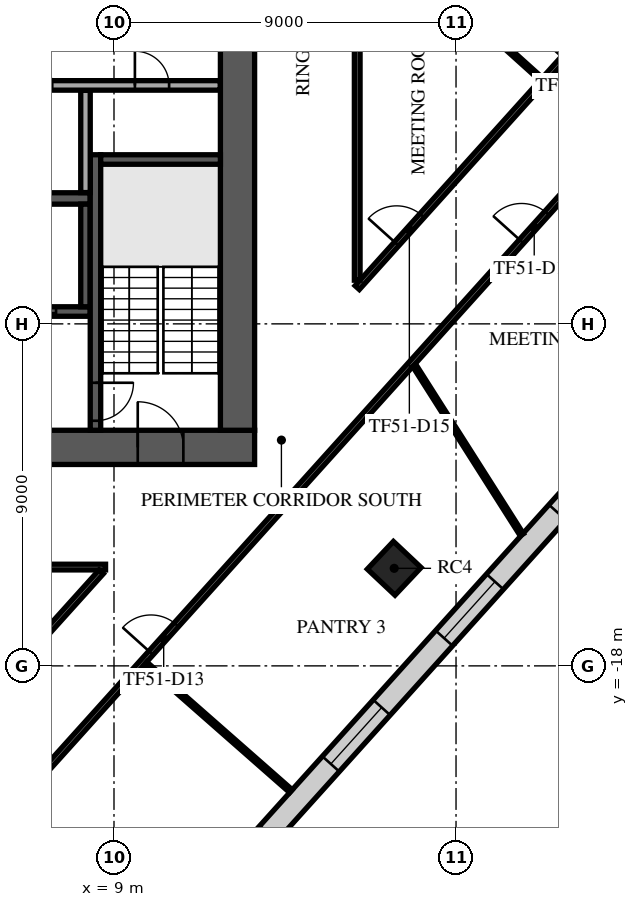
"""IFC4 building model, lengths in metres.
Left out: names, types, materials, properties, quantities, classifications, styles, units other than length and angle.
Written with IfcOpenShell. Run it as: python <this file> out.ifc"""

import sys

from ifc_helpers import new_model, si_unit, direction, frame, frame_2d, origin, origin_2d, place, context, subcontext, project, spatial, rectangle, extrude, element, fill, save


model = new_model("IFC4")
c1 = context("Model", 3, precision=1e-05, world=origin(), true_north=direction((0.0, 1.0)))
c2 = subcontext(c1, "Body", "Model", "MODEL_VIEW")
j1 = project(units=[si_unit("LENGTHUNIT", "METRE"), si_unit("PLANEANGLEUNIT", "RADIAN")], contexts=[c1])
p1 = place(None, origin())
s1 = spatial("IfcSite", under=j1, at=p1, CompositionType="ELEMENT")
p2 = place(p1, origin())
s2 = spatial("IfcBuilding", under=s1, at=p2, CompositionType="ELEMENT")
p3 = place(p2, frame((0.0, 0.0, 217.3)))
s3 = spatial("IfcBuildingStorey", under=s2, at=p3, CompositionType="ELEMENT", Elevation=217.3)
p4 = place(p3, frame((16.373, -15.433, 0.0), z_axis=(0.0, 0.0, 1.0), x_axis=(0.685916152371, 0.727680583715, 0.0)))
e1 = element("IfcColumn", 1, at=p4, inside=s3, PredefinedType="COLUMN", context=c2, shape_type="SweptSolid", body=[
    extrude(rectangle(XDim=1.0, YDim=1.0, at=origin_2d()), origin(), (0.0, 0.0, 1.0), 4.0),
])
p5 = place(p3, frame((-12.7, -12.25, 0.0), z_axis=(0.0, 0.0, 1.0), x_axis=(1.0, 0.0, 0.0)))
e2 = element("IfcWall", 2, at=p5, inside=s3, PredefinedType="SHEAR", context=c2, shape_type="SweptSolid", body=[
    extrude(rectangle(XDim=25.4, YDim=0.9, at=frame_2d((12.7, 0.0))), origin(), (0.0, 0.0, 1.0), 3.62),
])
p6 = place(p5, frame((7.6, 0.0, 0.0)))
e3 = element("IfcOpeningElement", 3, at=p6, cuts=e2, PredefinedType="OPENING", context=c2, shape_type="SweptSolid", body=[
    extrude(rectangle(XDim=2.0, YDim=2.1, at=frame_2d((1.0, 1.05))), frame((0.0, 0.46, 0.0), z_axis=(0.0, -1.0, 0.0), x_axis=(1.0, 0.0, 0.0)), (0.0, 0.0, 1.0), 0.92),
])
p7 = place(p5, frame((17.725, 0.0, 0.0)))
e4 = element("IfcOpeningElement", 4, at=p7, cuts=e2, PredefinedType="OPENING", context=c2, shape_type="SweptSolid", body=[
    extrude(rectangle(XDim=1.2, YDim=2.1, at=frame_2d((0.6, 1.05))), frame((0.0, 0.46, 0.0), z_axis=(0.0, -1.0, 0.0), x_axis=(1.0, 0.0, 0.0)), (0.0, 0.0, 1.0), 0.92),
])
p8 = place(p5, frame((1.875, 0.0, 0.0)))
e5 = element("IfcOpeningElement", 5, at=p8, cuts=e2, PredefinedType="OPENING", context=c2, shape_type="SweptSolid", body=[
    extrude(rectangle(XDim=1.2, YDim=2.1, at=frame_2d((0.6, 1.05))), frame((0.0, 0.46, 0.0), z_axis=(0.0, -1.0, 0.0), x_axis=(1.0, 0.0, 0.0)), (0.0, 0.0, 1.0), 0.92),
])
p9 = place(p5, frame((22.325, 0.0, 0.0)))
e6 = element("IfcOpeningElement", 6, at=p9, cuts=e2, PredefinedType="OPENING", context=c2, shape_type="SweptSolid", body=[
    extrude(rectangle(XDim=1.2, YDim=2.1, at=frame_2d((0.6, 1.05))), frame((0.0, 0.46, 0.0), z_axis=(0.0, -1.0, 0.0), x_axis=(1.0, 0.0, 0.0)), (0.0, 0.0, 1.0), 0.92),
])
p10 = place(p3, frame((12.25, -11.8, 0.0), z_axis=(0.0, 0.0, 1.0), x_axis=(0.0, 1.0, 0.0)))
e7 = element("IfcWall", 7, at=p10, inside=s3, PredefinedType="SHEAR", context=c2, shape_type="SweptSolid", body=[
    extrude(rectangle(XDim=23.6, YDim=0.9, at=frame_2d((11.8, 0.0))), origin(), (0.0, 0.0, 1.0), 3.62),
])
p11 = place(p10, frame((10.6, 0.0, 0.0)))
e8 = element("IfcOpeningElement", 8, at=p11, cuts=e7, PredefinedType="OPENING", context=c2, shape_type="SweptSolid", body=[
    extrude(rectangle(XDim=2.4, YDim=2.4, at=frame_2d((1.2, 1.2))), frame((0.0, 0.46, 0.0), z_axis=(0.0, -1.0, 0.0), x_axis=(1.0, 0.0, 0.0)), (0.0, 0.0, 1.0), 0.92),
])
p12 = place(p3, frame((-2.875, -5.7, 0.0), z_axis=(0.0, 0.0, 1.0), x_axis=(1.0, 0.0, 0.0)))
e9 = element("IfcWall", 9, at=p12, inside=s3, PredefinedType="SOLIDWALL", context=c2, shape_type="SweptSolid", body=[
    extrude(rectangle(XDim=11.25, YDim=0.3, at=frame_2d((5.625, 0.0))), origin(), (0.0, 0.0, 1.0), 3.62),
])
p13 = place(p3, frame((-2.875, -8.675, 0.0), z_axis=(0.0, 0.0, 1.0), x_axis=(1.0, 0.0, 0.0)))
e10 = element("IfcWall", 10, at=p13, inside=s3, PredefinedType="SOLIDWALL", context=c2, shape_type="SweptSolid", body=[
    extrude(rectangle(XDim=11.25, YDim=0.25, at=frame_2d((5.625, 0.0))), origin(), (0.0, 0.0, 1.0), 3.62),
])
p14 = place(p13, frame((0.9, 0.0, 0.0)))
e11 = element("IfcOpeningElement", 11, at=p14, cuts=e10, PredefinedType="OPENING", context=c2, shape_type="SweptSolid", body=[
    extrude(rectangle(XDim=1.2, YDim=2.1, at=frame_2d((0.6, 1.05))), frame((0.0, 0.135, 0.0), z_axis=(0.0, -1.0, 0.0), x_axis=(1.0, 0.0, 0.0)), (0.0, 0.0, 1.0), 0.27),
])
p15 = place(p13, frame((3.65, 0.0, 0.0)))
e12 = element("IfcOpeningElement", 12, at=p15, cuts=e10, PredefinedType="OPENING", context=c2, shape_type="SweptSolid", body=[
    extrude(rectangle(XDim=1.2, YDim=2.1, at=frame_2d((0.6, 1.05))), frame((0.0, 0.135, 0.0), z_axis=(0.0, -1.0, 0.0), x_axis=(1.0, 0.0, 0.0)), (0.0, 0.0, 1.0), 0.27),
])
p16 = place(p13, frame((6.4, 0.0, 0.0)))
e13 = element("IfcOpeningElement", 13, at=p16, cuts=e10, PredefinedType="OPENING", context=c2, shape_type="SweptSolid", body=[
    extrude(rectangle(XDim=1.2, YDim=2.1, at=frame_2d((0.6, 1.05))), frame((0.0, 0.135, 0.0), z_axis=(0.0, -1.0, 0.0), x_axis=(1.0, 0.0, 0.0)), (0.0, 0.0, 1.0), 0.27),
])
p17 = place(p13, frame((9.15, 0.0, 0.0)))
e14 = element("IfcOpeningElement", 14, at=p17, cuts=e10, PredefinedType="OPENING", context=c2, shape_type="SweptSolid", body=[
    extrude(rectangle(XDim=1.2, YDim=2.1, at=frame_2d((0.6, 1.05))), frame((0.0, 0.135, 0.0), z_axis=(0.0, -1.0, 0.0), x_axis=(1.0, 0.0, 0.0)), (0.0, 0.0, 1.0), 0.27),
])
p18 = place(p3, frame((8.25, -8.55, 0.0), z_axis=(0.0, 0.0, 1.0), x_axis=(0.0, 1.0, 0.0)))
e15 = element("IfcWall", 15, at=p18, inside=s3, PredefinedType="SOLIDWALL", context=c2, shape_type="SweptSolid", body=[
    extrude(rectangle(XDim=2.7, YDim=0.25, at=frame_2d((1.35, 0.0))), origin(), (0.0, 0.0, 1.0), 3.62),
])
p19 = place(p3, frame((8.512, -4.55, 0.0), z_axis=(0.0, 0.0, 1.0), x_axis=(0.0, -1.0, 0.0)))
e16 = element("IfcWall", 16, at=p19, inside=s3, PredefinedType="SOLIDWALL", context=c2, shape_type="SweptSolid", body=[
    extrude(rectangle(XDim=7.25, YDim=0.275, at=frame_2d((3.625, 0.0))), origin(), (0.0, 0.0, 1.0), 3.62),
])
p20 = place(p19, frame((6.0, 0.0, 0.0)))
e17 = element("IfcOpeningElement", 17, at=p20, cuts=e16, PredefinedType="OPENING", context=c2, shape_type="SweptSolid", body=[
    extrude(rectangle(XDim=1.0, YDim=2.1, at=frame_2d((0.5, 1.05))), frame((0.0, 0.147, 0.0), z_axis=(0.0, -1.0, 0.0), x_axis=(1.0, 0.0, 0.0)), (0.0, 0.0, 1.0), 0.295),
])
p21 = place(p3, frame((8.65, -4.675, 0.0), z_axis=(0.0, 0.0, 1.0), x_axis=(1.0, 0.0, 0.0)))
e18 = element("IfcWall", 18, at=p21, inside=s3, PredefinedType="SOLIDWALL", context=c2, shape_type="SweptSolid", body=[
    extrude(rectangle(XDim=3.15, YDim=0.25, at=frame_2d((1.575, 0.0))), origin(), (0.0, 0.0, 1.0), 3.62),
])
p22 = place(p3, frame((8.25, -5.545, 0.0), z_axis=(0.0, 0.0, 1.0), x_axis=(0.0, 1.0, 0.0)))
e19 = element("IfcWall", 19, at=p22, inside=s3, PredefinedType="PARTITIONING", context=c2, shape_type="SweptSolid", body=[
    extrude(rectangle(XDim=2.69, YDim=0.25, at=frame_2d((1.345, 0.0))), origin(), (0.0, 0.0, 1.0), 3.62),
])
p23 = place(p3, frame((5.63, -2.725, 0.0), z_axis=(0.0, 0.0, 1.0), x_axis=(1.0, 0.0, 0.0)))
e20 = element("IfcWall", 20, at=p23, inside=s3, PredefinedType="PARTITIONING", context=c2, shape_type="SweptSolid", body=[
    extrude(rectangle(XDim=6.165, YDim=0.25, at=frame_2d((3.083, 0.0))), origin(), (0.0, 0.0, 1.0), 3.62),
])
p24 = place(p23, frame((0.745, 0.0, 0.0)))
e21 = element("IfcOpeningElement", 21, at=p24, cuts=e20, PredefinedType="OPENING", context=c2, shape_type="SweptSolid", body=[
    extrude(rectangle(XDim=1.0, YDim=2.1, at=frame_2d((0.5, 1.05))), frame((0.0, 0.135, 0.0), z_axis=(0.0, -1.0, 0.0), x_axis=(1.0, 0.0, 0.0)), (0.0, 0.0, 1.0), 0.27),
])
p25 = place(p23, frame((3.92, 0.0, 0.0)))
e22 = element("IfcOpeningElement", 22, at=p25, cuts=e20, PredefinedType="OPENING", context=c2, shape_type="SweptSolid", body=[
    extrude(rectangle(XDim=0.9, YDim=2.1, at=frame_2d((0.45, 1.05))), frame((0.0, 0.135, 0.0), z_axis=(0.0, -1.0, 0.0), x_axis=(1.0, 0.0, 0.0)), (0.0, 0.0, 1.0), 0.27),
])
p26 = place(p3, frame((1.962, -34.735, 0.0), z_axis=(0.0, 0.0, 1.0), x_axis=(0.669133181838, 0.743142506497, 0.0)))
e23 = element("IfcWall", 23, at=p26, inside=s3, PredefinedType="STANDARD", context=c2, shape_type="SweptSolid", body=[
    extrude(rectangle(XDim=49.0, YDim=0.6, at=frame_2d((24.5, 0.0))), origin(), (0.0, 0.0, 1.0), 3.62),
])
p27 = place(p26, frame((1.227, 0.0, 0.9)))
e24 = element("IfcOpeningElement", 24, at=p27, cuts=e23, PredefinedType="OPENING", context=c2, shape_type="SweptSolid", body=[
    extrude(rectangle(XDim=2.0, YDim=2.1, at=frame_2d((1.0, 1.05))), frame((0.0, 0.31, 0.0), z_axis=(0.0, -1.0, 0.0), x_axis=(1.0, 0.0, 0.0)), (0.0, 0.0, 1.0), 0.62),
])
p28 = place(p26, frame((5.682, 0.0, 0.9)))
e25 = element("IfcOpeningElement", 25, at=p28, cuts=e23, PredefinedType="OPENING", context=c2, shape_type="SweptSolid", body=[
    extrude(rectangle(XDim=2.0, YDim=2.1, at=frame_2d((1.0, 1.05))), frame((0.0, 0.31, 0.0), z_axis=(0.0, -1.0, 0.0), x_axis=(1.0, 0.0, 0.0)), (0.0, 0.0, 1.0), 0.62),
])
p29 = place(p26, frame((10.136, 0.0, 0.9)))
e26 = element("IfcOpeningElement", 26, at=p29, cuts=e23, PredefinedType="OPENING", context=c2, shape_type="SweptSolid", body=[
    extrude(rectangle(XDim=2.0, YDim=2.1, at=frame_2d((1.0, 1.05))), frame((0.0, 0.31, 0.0), z_axis=(0.0, -1.0, 0.0), x_axis=(1.0, 0.0, 0.0)), (0.0, 0.0, 1.0), 0.62),
])
p30 = place(p26, frame((14.591, 0.0, 0.9)))
e27 = element("IfcOpeningElement", 27, at=p30, cuts=e23, PredefinedType="OPENING", context=c2, shape_type="SweptSolid", body=[
    extrude(rectangle(XDim=2.0, YDim=2.1, at=frame_2d((1.0, 1.05))), frame((0.0, 0.31, 0.0), z_axis=(0.0, -1.0, 0.0), x_axis=(1.0, 0.0, 0.0)), (0.0, 0.0, 1.0), 0.62),
])
p31 = place(p26, frame((19.045, 0.0, 0.9)))
e28 = element("IfcOpeningElement", 28, at=p31, cuts=e23, PredefinedType="OPENING", context=c2, shape_type="SweptSolid", body=[
    extrude(rectangle(XDim=2.0, YDim=2.1, at=frame_2d((1.0, 1.05))), frame((0.0, 0.31, 0.0), z_axis=(0.0, -1.0, 0.0), x_axis=(1.0, 0.0, 0.0)), (0.0, 0.0, 1.0), 0.62),
])
p32 = place(p26, frame((23.5, 0.0, 0.9)))
e29 = element("IfcOpeningElement", 29, at=p32, cuts=e23, PredefinedType="OPENING", context=c2, shape_type="SweptSolid", body=[
    extrude(rectangle(XDim=2.0, YDim=2.1, at=frame_2d((1.0, 1.05))), frame((0.0, 0.31, 0.0), z_axis=(0.0, -1.0, 0.0), x_axis=(1.0, 0.0, 0.0)), (0.0, 0.0, 1.0), 0.62),
])
p33 = place(p26, frame((27.955, 0.0, 0.9)))
e30 = element("IfcOpeningElement", 30, at=p33, cuts=e23, PredefinedType="OPENING", context=c2, shape_type="SweptSolid", body=[
    extrude(rectangle(XDim=2.0, YDim=2.1, at=frame_2d((1.0, 1.05))), frame((0.0, 0.31, 0.0), z_axis=(0.0, -1.0, 0.0), x_axis=(1.0, 0.0, 0.0)), (0.0, 0.0, 1.0), 0.62),
])
p34 = place(p26, frame((32.409, 0.0, 0.9)))
e31 = element("IfcOpeningElement", 31, at=p34, cuts=e23, PredefinedType="OPENING", context=c2, shape_type="SweptSolid", body=[
    extrude(rectangle(XDim=2.0, YDim=2.1, at=frame_2d((1.0, 1.05))), frame((0.0, 0.31, 0.0), z_axis=(0.0, -1.0, 0.0), x_axis=(1.0, 0.0, 0.0)), (0.0, 0.0, 1.0), 0.62),
])
p35 = place(p26, frame((36.864, 0.0, 0.9)))
e32 = element("IfcOpeningElement", 32, at=p35, cuts=e23, PredefinedType="OPENING", context=c2, shape_type="SweptSolid", body=[
    extrude(rectangle(XDim=2.0, YDim=2.1, at=frame_2d((1.0, 1.05))), frame((0.0, 0.31, 0.0), z_axis=(0.0, -1.0, 0.0), x_axis=(1.0, 0.0, 0.0)), (0.0, 0.0, 1.0), 0.62),
])
p36 = place(p26, frame((41.318, 0.0, 0.9)))
e33 = element("IfcOpeningElement", 33, at=p36, cuts=e23, PredefinedType="OPENING", context=c2, shape_type="SweptSolid", body=[
    extrude(rectangle(XDim=2.0, YDim=2.1, at=frame_2d((1.0, 1.05))), frame((0.0, 0.31, 0.0), z_axis=(0.0, -1.0, 0.0), x_axis=(1.0, 0.0, 0.0)), (0.0, 0.0, 1.0), 0.62),
])
p37 = place(p26, frame((45.773, 0.0, 0.9)))
e34 = element("IfcOpeningElement", 34, at=p37, cuts=e23, PredefinedType="OPENING", context=c2, shape_type="SweptSolid", body=[
    extrude(rectangle(XDim=2.0, YDim=2.1, at=frame_2d((1.0, 1.05))), frame((0.0, 0.31, 0.0), z_axis=(0.0, -1.0, 0.0), x_axis=(1.0, 0.0, 0.0)), (0.0, 0.0, 1.0), 0.62),
])
p38 = place(p3, frame((-7.715, -15.4, 0.0), z_axis=(0.0, 0.0, 1.0), x_axis=(1.0, 0.0, 0.0)))
e35 = element("IfcWall", 35, at=p38, inside=s3, PredefinedType="PARTITIONING", context=c2, shape_type="SweptSolid", body=[
    extrude(rectangle(XDim=16.493, YDim=0.15, at=frame_2d((8.246, 0.0))), origin(), (0.0, 0.0, 1.0), 3.17),
])
p39 = place(p38, frame((2.3, 0.0, 0.0)))
e36 = element("IfcOpeningElement", 36, at=p39, cuts=e35, PredefinedType="OPENING", context=c2, shape_type="SweptSolid", body=[
    extrude(rectangle(XDim=1.8, YDim=2.1, at=frame_2d((0.9, 1.05))), frame((0.0, 0.085, 0.0), z_axis=(0.0, -1.0, 0.0), x_axis=(1.0, 0.0, 0.0)), (0.0, 0.0, 1.0), 0.17),
])
p40 = place(p38, frame((9.311, 0.0, 0.0)))
e37 = element("IfcOpeningElement", 37, at=p40, cuts=e35, PredefinedType="OPENING", context=c2, shape_type="SweptSolid", body=[
    extrude(rectangle(XDim=1.0, YDim=2.1, at=frame_2d((0.5, 1.05))), frame((0.0, 0.085, 0.0), z_axis=(0.0, -1.0, 0.0), x_axis=(1.0, 0.0, 0.0)), (0.0, 0.0, 1.0), 0.17),
])
p41 = place(p3, frame((1.843, -23.103, 0.0), z_axis=(0.0, 0.0, 1.0), x_axis=(0.669082457394, 0.743188176176, 0.0)))
e38 = element("IfcWall", 38, at=p41, inside=s3, PredefinedType="PARTITIONING", context=c2, shape_type="SweptSolid", body=[
    extrude(rectangle(XDim=10.197, YDim=0.15, at=frame_2d((5.098, 0.0))), origin(), (0.0, 0.0, 1.0), 3.17),
])
p42 = place(p41, frame((1.05, 0.0, 0.0)))
e39 = element("IfcOpeningElement", 39, at=p42, cuts=e38, PredefinedType="OPENING", context=c2, shape_type="SweptSolid", body=[
    extrude(rectangle(XDim=1.8, YDim=2.1, at=frame_2d((0.9, 1.05))), frame((0.0, 0.085, 0.0), z_axis=(0.0, -1.0, 0.0), x_axis=(1.0, 0.0, 0.0)), (0.0, 0.0, 1.0), 0.17),
])
p43 = place(p3, frame((3.676, -24.653, 0.0), z_axis=(0.0, 0.0, 1.0), x_axis=(0.669124220942, 0.743150574882, 0.0)))
e40 = element("IfcWall", 40, at=p43, inside=s3, PredefinedType="PARTITIONING", context=c2, shape_type="SweptSolid", body=[
    extrude(rectangle(XDim=31.796, YDim=0.15, at=frame_2d((15.898, 0.0))), origin(), (0.0, 0.0, 1.0), 3.17),
])
p44 = place(p43, frame((9.41, 0.0, 0.0)))
e41 = element("IfcOpeningElement", 41, at=p44, cuts=e40, PredefinedType="OPENING", context=c2, shape_type="SweptSolid", body=[
    extrude(rectangle(XDim=1.0, YDim=2.1, at=frame_2d((0.5, 1.05))), frame((0.0, 0.085, 0.0), z_axis=(0.0, -1.0, 0.0), x_axis=(1.0, 0.0, 0.0)), (0.0, 0.0, 1.0), 0.17),
])
p45 = place(p43, frame((23.981, 0.0, 0.0)))
e42 = element("IfcOpeningElement", 42, at=p45, cuts=e40, PredefinedType="OPENING", context=c2, shape_type="SweptSolid", body=[
    extrude(rectangle(XDim=1.0, YDim=2.1, at=frame_2d((0.5, 1.05))), frame((0.0, 0.085, 0.0), z_axis=(0.0, -1.0, 0.0), x_axis=(1.0, 0.0, 0.0)), (0.0, 0.0, 1.0), 0.17),
])
p46 = place(p3, frame((15.4, -8.046, 0.0), z_axis=(0.0, 0.0, 1.0), x_axis=(0.669150592904, 0.743126829025, 0.0)))
e43 = element("IfcWall", 43, at=p46, inside=s3, PredefinedType="PARTITIONING", context=c2, shape_type="SweptSolid", body=[
    extrude(rectangle(XDim=11.61, YDim=0.15, at=frame_2d((5.805, 0.0))), origin(), (0.0, 0.0, 1.0), 3.17),
])
p47 = place(p46, frame((1.55, 0.0, 0.0)))
e44 = element("IfcOpeningElement", 44, at=p47, cuts=e43, PredefinedType="OPENING", context=c2, shape_type="SweptSolid", body=[
    extrude(rectangle(XDim=1.0, YDim=2.1, at=frame_2d((0.5, 1.05))), frame((0.0, 0.085, 0.0), z_axis=(0.0, -1.0, 0.0), x_axis=(1.0, 0.0, 0.0)), (0.0, 0.0, 1.0), 0.17),
])
p48 = place(p46, frame((8.116, 0.0, 0.0)))
e45 = element("IfcOpeningElement", 45, at=p48, cuts=e43, PredefinedType="OPENING", context=c2, shape_type="SweptSolid", body=[
    extrude(rectangle(XDim=1.0, YDim=2.1, at=frame_2d((0.5, 1.05))), frame((0.0, 0.085, 0.0), z_axis=(0.0, -1.0, 0.0), x_axis=(1.0, 0.0, 0.0)), (0.0, 0.0, 1.0), 0.17),
])
p49 = place(p3, frame((15.4, -7.851, 0.0), z_axis=(0.0, 0.0, 1.0), x_axis=(0.0, 1.0, 0.0)))
e46 = element("IfcWall", 46, at=p49, inside=s3, PredefinedType="PARTITIONING", context=c2, shape_type="SweptSolid", body=[
    extrude(rectangle(XDim=18.309, YDim=0.15, at=frame_2d((9.154, 0.0))), origin(), (0.0, 0.0, 1.0), 3.17),
])
p50 = place(p3, frame((9.829, -17.933, 0.0), z_axis=(0.0, 0.0, 1.0), x_axis=(0.751096490624, -0.660192442984, 0.0)))
e47 = element("IfcWall", 47, at=p50, inside=s3, PredefinedType="PARTITIONING", context=c2, shape_type="SweptSolid", body=[
    extrude(rectangle(XDim=5.095, YDim=0.1, at=frame_2d((2.547, 0.0))), origin(), (0.0, 0.0, 1.0), 2.97),
])
p51 = place(p3, frame((15.509, 1.7, 0.0), z_axis=(0.0, 0.0, 1.0), x_axis=(0.743166359939, -0.669106689142, 0.0)))
e48 = element("IfcWall", 48, at=p51, inside=s3, PredefinedType="PARTITIONING", context=c2, shape_type="SweptSolid", body=[
    extrude(rectangle(XDim=6.366, YDim=0.1, at=frame_2d((3.183, 0.0))), origin(), (0.0, 0.0, 1.0), 3.17),
])
p52 = place(p3, frame((16.902, -10.096, 0.0), z_axis=(0.0, 0.0, 1.0), x_axis=(0.536270420215, -0.84404622883, 0.0)))
e49 = element("IfcWall", 49, at=p52, inside=s3, PredefinedType="PARTITIONING", context=c2, shape_type="SweptSolid", body=[
    extrude(rectangle(XDim=5.275, YDim=0.1, at=frame_2d((2.638, 0.0))), origin(), (0.0, 0.0, 1.0), 2.97),
])
p53 = place(p9, origin())
e50 = element("IfcDoor", 50, at=p53, inside=s3, OperationType="SINGLE_SWING_LEFT", PredefinedType="DOOR", context=c2, shape_type="SweptSolid", body=[
    extrude(rectangle(XDim=1.2, YDim=2.1, at=frame_2d((0.6, 1.05))), frame((0.0, 0.025, 0.0), z_axis=(0.0, -1.0, 0.0), x_axis=(1.0, 0.0, 0.0)), (0.0, 0.0, 1.0), 0.05),
])
fill(e6, e50)
p54 = place(p17, origin())
e51 = element("IfcDoor", 51, at=p54, inside=s3, OperationType="DOUBLE_DOOR_SLIDING", PredefinedType="DOOR", context=c2, shape_type="SweptSolid", body=[
    extrude(rectangle(XDim=1.2, YDim=2.1, at=frame_2d((0.6, 1.05))), frame((0.0, 0.025, 0.0), z_axis=(0.0, -1.0, 0.0), x_axis=(1.0, 0.0, 0.0)), (0.0, 0.0, 1.0), 0.05),
])
fill(e14, e51)
p55 = place(p20, origin())
e52 = element("IfcDoor", 52, at=p55, inside=s3, OperationType="SINGLE_SWING_LEFT", PredefinedType="DOOR", context=c2, shape_type="SweptSolid", body=[
    extrude(rectangle(XDim=1.0, YDim=2.1, at=frame_2d((0.5, 1.05))), frame((0.0, 0.025, 0.0), z_axis=(0.0, -1.0, 0.0), x_axis=(1.0, 0.0, 0.0)), (0.0, 0.0, 1.0), 0.05),
])
fill(e17, e52)
p56 = place(p25, origin())
e53 = element("IfcDoor", 53, at=p56, inside=s3, OperationType="SINGLE_SWING_RIGHT", PredefinedType="DOOR", context=c2, shape_type="SweptSolid", body=[
    extrude(rectangle(XDim=0.9, YDim=2.1, at=frame_2d((0.45, 1.05))), frame((0.0, 0.025, 0.0), z_axis=(0.0, -1.0, 0.0), x_axis=(1.0, 0.0, 0.0)), (0.0, 0.0, 1.0), 0.05),
])
fill(e22, e53)
p57 = place(p31, origin())
e54 = element("IfcWindow", 54, at=p57, inside=s3, PartitioningType="SINGLE_PANEL", PredefinedType="WINDOW", context=c2, shape_type="SweptSolid", body=[
    extrude(rectangle(XDim=2.0, YDim=2.1, at=frame_2d((1.0, 1.05))), frame((0.0, 0.03, 0.0), z_axis=(0.0, -1.0, 0.0), x_axis=(1.0, 0.0, 0.0)), (0.0, 0.0, 1.0), 0.06),
])
fill(e28, e54)
p58 = place(p32, origin())
e55 = element("IfcWindow", 55, at=p58, inside=s3, PartitioningType="SINGLE_PANEL", PredefinedType="WINDOW", context=c2, shape_type="SweptSolid", body=[
    extrude(rectangle(XDim=2.0, YDim=2.1, at=frame_2d((1.0, 1.05))), frame((0.0, 0.03, 0.0), z_axis=(0.0, -1.0, 0.0), x_axis=(1.0, 0.0, 0.0)), (0.0, 0.0, 1.0), 0.06),
])
fill(e29, e55)
p59 = place(p33, origin())
e56 = element("IfcWindow", 56, at=p59, inside=s3, PartitioningType="SINGLE_PANEL", PredefinedType="WINDOW", context=c2, shape_type="SweptSolid", body=[
    extrude(rectangle(XDim=2.0, YDim=2.1, at=frame_2d((1.0, 1.05))), frame((0.0, 0.03, 0.0), z_axis=(0.0, -1.0, 0.0), x_axis=(1.0, 0.0, 0.0)), (0.0, 0.0, 1.0), 0.06),
])
fill(e30, e56)
p60 = place(p44, frame((1.0, 0.0, 0.0), z_axis=(0.0, 0.0, 1.0), x_axis=(-1.0, 0.0, 0.0)))
e57 = element("IfcDoor", 57, at=p60, inside=s3, OperationType="SINGLE_SWING_LEFT", PredefinedType="DOOR", context=c2, shape_type="SweptSolid", body=[
    extrude(rectangle(XDim=1.0, YDim=2.1, at=frame_2d((0.5, 1.05))), frame((0.0, 0.025, 0.0), z_axis=(0.0, -1.0, 0.0), x_axis=(1.0, 0.0, 0.0)), (0.0, 0.0, 1.0), 0.05),
])
fill(e41, e57)
p61 = place(p47, origin())
e58 = element("IfcDoor", 58, at=p61, inside=s3, OperationType="SINGLE_SWING_LEFT", PredefinedType="DOOR", context=c2, shape_type="SweptSolid", body=[
    extrude(rectangle(XDim=1.0, YDim=2.1, at=frame_2d((0.5, 1.05))), frame((0.0, 0.025, 0.0), z_axis=(0.0, -1.0, 0.0), x_axis=(1.0, 0.0, 0.0)), (0.0, 0.0, 1.0), 0.05),
])
fill(e44, e58)
p62 = place(p45, frame((1.0, 0.0, 0.0), z_axis=(0.0, 0.0, 1.0), x_axis=(-1.0, 0.0, 0.0)))
e59 = element("IfcDoor", 59, at=p62, inside=s3, OperationType="SINGLE_SWING_LEFT", PredefinedType="DOOR", context=c2, shape_type="SweptSolid", body=[
    extrude(rectangle(XDim=1.0, YDim=2.1, at=frame_2d((0.5, 1.05))), frame((0.0, 0.025, 0.0), z_axis=(0.0, -1.0, 0.0), x_axis=(1.0, 0.0, 0.0)), (0.0, 0.0, 1.0), 0.05),
])
fill(e42, e59)
save(model, sys.argv[1])
